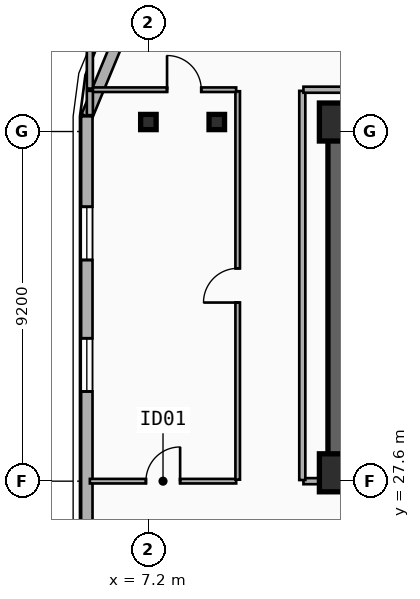
"""IFC4 building model, lengths in metres.
Left out: names, types, materials, properties, quantities, classifications, styles, units other than length and angle.
Written with IfcOpenShell. Run it as: python <this file> out.ifc"""

import sys

from ifc_helpers import new_model, si_unit, direction, frame, frame_2d, origin, origin_2d, place, context, subcontext, project, spatial, rectangle, i_section, extrude, element, fill, save


model = new_model("IFC4")
c1 = context("Model", 3, precision=1e-05, world=origin(), true_north=direction((0.0, 1.0)))
c2 = subcontext(c1, "Body", "Model", "MODEL_VIEW")
j1 = project(units=[si_unit("LENGTHUNIT", "METRE"), si_unit("PLANEANGLEUNIT", "RADIAN")], contexts=[c1])
p1 = place(None, origin())
s1 = spatial("IfcSite", under=j1, at=p1, CompositionType="ELEMENT")
p2 = place(p1, origin())
s2 = spatial("IfcBuilding", under=s1, at=p2, CompositionType="ELEMENT")
p3 = place(p2, frame((0.0, 0.0, 218.4)))
s3 = spatial("IfcBuildingStorey", under=s2, at=p3, CompositionType="ELEMENT", Elevation=218.4)
p4 = place(p3, frame((12.15, 37.05, 0.0), z_axis=(0.0, 0.0, 1.0), x_axis=(1.0, 0.0, 0.0)))
e1 = element("IfcWall", 1, at=p4, inside=s3, PredefinedType="SHEAR", context=c2, shape_type="SweptSolid", body=[
    extrude(rectangle(XDim=33.23, YDim=0.45, at=frame_2d((16.615, 0.0))), origin(), (0.0, 0.0, 1.0), 3.6),
])
p5 = place(p3, frame((21.18, 27.82, 0.0), z_axis=(0.0, 0.0, 1.0), x_axis=(-1.0, 0.0, 0.0)))
e2 = element("IfcWall", 2, at=p5, inside=s3, PredefinedType="SHEAR", context=c2, shape_type="SweptSolid", body=[
    extrude(rectangle(XDim=9.03, YDim=0.45, at=frame_2d((4.515, 0.0))), origin(), (0.0, 0.0, 1.0), 3.6),
])
p6 = place(p5, frame((2.68, 0.0, 0.0)))
e3 = element("IfcOpeningElement", 3, at=p6, cuts=e2, PredefinedType="OPENING", context=c2, shape_type="SweptSolid", body=[
    extrude(rectangle(XDim=1.1, YDim=2.15, at=frame_2d((0.55, 1.075))), frame((0.0, 0.235, 0.0), z_axis=(0.0, -1.0, 0.0), x_axis=(1.0, 0.0, 0.0)), (0.0, 0.0, 1.0), 0.47),
])
p7 = place(p3, frame((12.15, 28.045, 0.0), z_axis=(0.0, 0.0, 1.0), x_axis=(0.0, 1.0, 0.0)))
e4 = element("IfcWall", 4, at=p7, inside=s3, PredefinedType="SHEAR", context=c2, shape_type="SweptSolid", body=[
    extrude(rectangle(XDim=8.78, YDim=0.45, at=frame_2d((4.39, 0.0))), origin(), (0.0, 0.0, 1.0), 3.6),
])
for number, where, z_axis, x_axis in (
    (5, (12.2, 27.82, 0.0), (0.0, 0.0, 1.0), (1.0, 0.0, 0.0)),
    (6, (12.2, 37.05, 0.0), (0.0, 0.0, 1.0), (1.0, 0.0, 0.0)),
):
    element("IfcColumn", number, at=place(p3, frame(where, z_axis=z_axis, x_axis=x_axis)), inside=s3, PredefinedType="COLUMN", context=c2, shape_type="SweptSolid", body=[
        extrude(rectangle(XDim=1.0, YDim=1.0, at=origin_2d()), origin(), (0.0, 0.0, 1.0), 3.6),
    ])
for number, where, z_axis, x_axis in (
    (7, (9.0, 37.05, 0.0), (0.0, 0.0, 1.0), (1.0, 0.0, 0.0)),
    (8, (7.2, 37.05, 0.0), (0.0, 0.0, 1.0), (1.0, 0.0, 0.0)),
):
    element("IfcColumn", number, at=place(p3, frame(where, z_axis=z_axis, x_axis=x_axis)), inside=s3, PredefinedType="COLUMN", context=c2, shape_type="SweptSolid", body=[
        extrude(i_section(OverallWidth=0.408, OverallDepth=0.4, WebThickness=0.025, FlangeThickness=0.039, FilletRadius=0.015, at=origin_2d()), origin(), (0.0, 0.0, 1.0), 3.6),
    ])
p8 = place(p3, frame((5.58, 37.2, 0.0), z_axis=(0.0, 0.0, 1.0), x_axis=(0.382636798336, 0.92389884758, 0.0)))
e9 = element("IfcWall", 9, at=p8, inside=s3, PredefinedType="SOLIDWALL", context=c2, shape_type="SweptSolid", body=[
    extrude(rectangle(XDim=3.077, YDim=0.3, at=frame_2d((1.538, 0.0))), origin(), (0.0, 0.0, 1.0), 3.34),
])
p9 = place(p3, frame((5.58, 8.6, 0.0), z_axis=(0.0, 0.0, 1.0), x_axis=(0.0, 1.0, 0.0)))
e10 = element("IfcWall", 10, at=p9, inside=s3, PredefinedType="SOLIDWALL", context=c2, shape_type="SweptSolid", body=[
    extrude(rectangle(XDim=28.6, YDim=0.3, at=frame_2d((14.3, 0.0))), origin(), (0.0, 0.0, 1.0), 3.34),
])
p10 = place(p9, frame((21.36, 0.0, 0.34)))
e11 = element("IfcOpeningElement", 11, at=p10, cuts=e10, PredefinedType="OPENING", context=c2, shape_type="SweptSolid", body=[
    extrude(rectangle(XDim=1.4, YDim=2.1, at=frame_2d((0.7, 1.05))), frame((0.0, 0.16, 0.0), z_axis=(0.0, -1.0, 0.0), x_axis=(1.0, 0.0, 0.0)), (0.0, 0.0, 1.0), 0.32),
])
p11 = place(p9, frame((24.82, 0.0, 0.34)))
e12 = element("IfcOpeningElement", 12, at=p11, cuts=e10, PredefinedType="OPENING", context=c2, shape_type="SweptSolid", body=[
    extrude(rectangle(XDim=1.4, YDim=2.1, at=frame_2d((0.7, 1.05))), frame((0.0, 0.16, 0.0), z_axis=(0.0, -1.0, 0.0), x_axis=(1.0, 0.0, 0.0)), (0.0, 0.0, 1.0), 0.32),
])
p12 = place(p9, frame((4.797, 0.0, 0.34)))
e13 = element("IfcOpeningElement", 13, at=p12, cuts=e10, PredefinedType="OPENING", context=c2, shape_type="SweptSolid", body=[
    extrude(rectangle(XDim=1.4, YDim=2.1, at=frame_2d((0.7, 1.05))), frame((0.0, 0.16, 0.0), z_axis=(0.0, -1.0, 0.0), x_axis=(1.0, 0.0, 0.0)), (0.0, 0.0, 1.0), 0.32),
])
p13 = place(p9, frame((10.673, 0.0, 0.34)))
e14 = element("IfcOpeningElement", 14, at=p13, cuts=e10, PredefinedType="OPENING", context=c2, shape_type="SweptSolid", body=[
    extrude(rectangle(XDim=1.4, YDim=2.1, at=frame_2d((0.7, 1.05))), frame((0.0, 0.16, 0.0), z_axis=(0.0, -1.0, 0.0), x_axis=(1.0, 0.0, 0.0)), (0.0, 0.0, 1.0), 0.32),
])
p14 = place(p3, frame((5.66, 27.6, 0.0), z_axis=(0.0, 0.0, 1.0), x_axis=(1.0, 0.0, 0.0)))
e15 = element("IfcWall", 15, at=p14, inside=s3, PredefinedType="PARTITIONING", context=c2, shape_type="SweptSolid", body=[
    extrude(rectangle(XDim=3.85, YDim=0.12, at=frame_2d((1.925, 0.0))), origin(), (0.0, 0.0, 1.0), 2.67),
])
p15 = place(p14, frame((1.475, 0.0, 0.0)))
e16 = element("IfcOpeningElement", 16, at=p15, cuts=e15, PredefinedType="OPENING", context=c2, shape_type="SweptSolid", body=[
    extrude(rectangle(XDim=0.9, YDim=2.1, at=frame_2d((0.45, 1.05))), frame((0.0, 0.07, 0.0), z_axis=(0.0, -1.0, 0.0), x_axis=(1.0, 0.0, 0.0)), (0.0, 0.0, 1.0), 0.14),
])
p16 = place(p3, frame((9.55, 27.64, 0.0), z_axis=(0.0, 0.0, 1.0), x_axis=(0.0, 1.0, 0.0)))
e17 = element("IfcWall", 17, at=p16, inside=s3, PredefinedType="PARTITIONING", context=c2, shape_type="SweptSolid", body=[
    extrude(rectangle(XDim=10.22, YDim=0.12, at=frame_2d((5.11, 0.0))), origin(), (0.0, 0.0, 1.0), 2.82),
])
p17 = place(p16, frame((4.66, 0.0, 0.0)))
e18 = element("IfcOpeningElement", 18, at=p17, cuts=e17, PredefinedType="OPENING", context=c2, shape_type="SweptSolid", body=[
    extrude(rectangle(XDim=0.9, YDim=2.1, at=frame_2d((0.45, 1.05))), frame((0.0, 0.07, 0.0), z_axis=(0.0, -1.0, 0.0), x_axis=(1.0, 0.0, 0.0)), (0.0, 0.0, 1.0), 0.14),
])
p18 = place(p3, frame((5.66, 37.9, 0.0), z_axis=(0.0, 0.0, 1.0), x_axis=(1.0, 0.0, 0.0)))
e19 = element("IfcWall", 19, at=p18, inside=s3, PredefinedType="PARTITIONING", context=c2, shape_type="SweptSolid", body=[
    extrude(rectangle(XDim=3.85, YDim=0.12, at=frame_2d((1.925, 0.0))), origin(), (0.0, 0.0, 1.0), 3.34),
])
p19 = place(p18, frame((2.031, 0.0, 0.0)))
e20 = element("IfcOpeningElement", 20, at=p19, cuts=e19, PredefinedType="OPENING", context=c2, shape_type="SweptSolid", body=[
    extrude(rectangle(XDim=0.9, YDim=2.1, at=frame_2d((0.45, 1.05))), frame((0.0, 0.07, 0.0), z_axis=(0.0, -1.0, 0.0), x_axis=(1.0, 0.0, 0.0)), (0.0, 0.0, 1.0), 0.14),
])
p20 = place(p3, frame((11.28, 27.6, 0.0), z_axis=(0.0, 0.0, 1.0), x_axis=(1.0, 0.0, 0.0)))
e21 = element("IfcWall", 21, at=p20, inside=s3, PredefinedType="PARTITIONING", context=c2, shape_type="SweptSolid", body=[
    extrude(rectangle(XDim=0.84, YDim=0.16, at=frame_2d((0.42, 0.0))), origin(), (0.0, 0.0, 1.0), 2.41),
])
p21 = place(p3, frame((11.25, 27.63, 0.0), z_axis=(0.0, 0.0, 1.0), x_axis=(0.0, 1.0, 0.0)))
e22 = element("IfcWall", 22, at=p21, inside=s3, PredefinedType="PARTITIONING", context=c2, shape_type="SweptSolid", body=[
    extrude(rectangle(XDim=10.24, YDim=0.16, at=frame_2d((5.12, 0.0))), origin(), (0.0, 0.0, 1.0), 2.82),
])
p22 = place(p3, frame((11.28, 37.9, 0.0), z_axis=(0.0, 0.0, 1.0), x_axis=(1.0, 0.0, 0.0)))
e23 = element("IfcWall", 23, at=p22, inside=s3, PredefinedType="PARTITIONING", context=c2, shape_type="SweptSolid", body=[
    extrude(rectangle(XDim=35.04, YDim=0.16, at=frame_2d((17.52, 0.0))), origin(), (0.0, 0.0, 1.0), 3.34),
])
p23 = place(p3, frame((5.66, 37.93, 0.0), z_axis=(0.0, 0.0, 1.0), x_axis=(0.0, 1.0, 0.0)))
e24 = element("IfcWall", 24, at=p23, inside=s3, PredefinedType="PARTITIONING", context=c2, shape_type="SweptSolid", body=[
    extrude(rectangle(XDim=1.44, YDim=0.16, at=frame_2d((0.72, 0.0))), origin(), (0.0, 0.0, 1.0), 3.34),
])
p24 = place(p3, frame((5.66, 37.23, 0.0), z_axis=(0.0, 0.0, 1.0), x_axis=(0.0, 1.0, 0.0)))
e25 = element("IfcWall", 25, at=p24, inside=s3, PredefinedType="PARTITIONING", context=c2, shape_type="SweptSolid", body=[
    extrude(rectangle(XDim=0.64, YDim=0.16, at=frame_2d((0.32, 0.0))), origin(), (0.0, 0.0, 1.0), 3.34),
])
p25 = place(p10, origin())
e26 = element("IfcWindow", 26, at=p25, inside=s3, PartitioningType="SINGLE_PANEL", PredefinedType="WINDOW", context=c2, shape_type="SweptSolid", body=[
    extrude(rectangle(XDim=1.4, YDim=2.1, at=frame_2d((0.7, 1.05))), frame((0.0, 0.03, 0.0), z_axis=(0.0, -1.0, 0.0), x_axis=(1.0, 0.0, 0.0)), (0.0, 0.0, 1.0), 0.06),
])
fill(e11, e26)
p26 = place(p11, origin())
e27 = element("IfcWindow", 27, at=p26, inside=s3, PartitioningType="SINGLE_PANEL", PredefinedType="WINDOW", context=c2, shape_type="SweptSolid", body=[
    extrude(rectangle(XDim=1.4, YDim=2.1, at=frame_2d((0.7, 1.05))), frame((0.0, 0.03, 0.0), z_axis=(0.0, -1.0, 0.0), x_axis=(1.0, 0.0, 0.0)), (0.0, 0.0, 1.0), 0.06),
])
fill(e12, e27)
p27 = place(p15, origin())
e28 = element("IfcDoor", 28, at=p27, inside=s3, OperationType="SINGLE_SWING_RIGHT", PredefinedType="DOOR", context=c2, shape_type="SweptSolid", body=[
    extrude(rectangle(XDim=0.9, YDim=2.1, at=frame_2d((0.45, 1.05))), frame((0.0, 0.025, 0.0), z_axis=(0.0, -1.0, 0.0), x_axis=(1.0, 0.0, 0.0)), (0.0, 0.0, 1.0), 0.05),
])
fill(e16, e28)
p28 = place(p17, origin())
e29 = element("IfcDoor", 29, at=p28, inside=s3, OperationType="SINGLE_SWING_LEFT", PredefinedType="DOOR", context=c2, shape_type="SweptSolid", body=[
    extrude(rectangle(XDim=0.9, YDim=2.1, at=frame_2d((0.45, 1.05))), frame((0.0, 0.025, 0.0), z_axis=(0.0, -1.0, 0.0), x_axis=(1.0, 0.0, 0.0)), (0.0, 0.0, 1.0), 0.05),
])
fill(e18, e29)
p29 = place(p19, origin())
e30 = element("IfcDoor", 30, at=p29, inside=s3, OperationType="SINGLE_SWING_LEFT", PredefinedType="DOOR", context=c2, shape_type="SweptSolid", body=[
    extrude(rectangle(XDim=0.9, YDim=2.1, at=frame_2d((0.45, 1.05))), frame((0.0, 0.025, 0.0), z_axis=(0.0, -1.0, 0.0), x_axis=(1.0, 0.0, 0.0)), (0.0, 0.0, 1.0), 0.05),
])
fill(e20, e30)
save(model, sys.argv[1])
